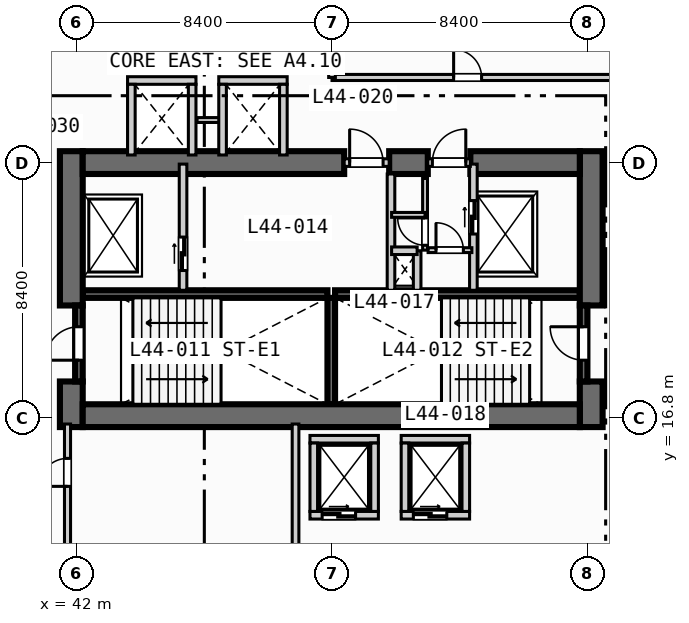
"""IFC4 building model, lengths in metres.
Left out: names, types, materials, properties, quantities, classifications, styles, units other than length and angle.
Written with IfcOpenShell. Run it as: python <this file> out.ifc"""

import sys

from ifc_helpers import new_model, si_unit, direction, frame, frame_2d, origin, place, context, subcontext, project, spatial, rectangle, extrude, element, fill, save


model = new_model("IFC4")
c1 = context("Model", 3, precision=1e-05, world=origin(), true_north=direction((0.0, 1.0)))
c2 = subcontext(c1, "Body", "Model", "MODEL_VIEW")
j1 = project(units=[si_unit("LENGTHUNIT", "METRE"), si_unit("PLANEANGLEUNIT", "RADIAN")], contexts=[c1])
p1 = place(None, origin())
s1 = spatial("IfcSite", under=j1, at=p1, CompositionType="ELEMENT")
p2 = place(p1, origin())
s2 = spatial("IfcBuilding", under=s1, at=p2, CompositionType="ELEMENT")
p3 = place(p2, frame((0.0, 0.0, 182.8)))
s3 = spatial("IfcBuildingStorey", under=s2, at=p3, CompositionType="ELEMENT", Elevation=182.8)
for number, where, z_axis, x_axis in (
    (1, (42.2, 20.875, 0.0), (0.0, 0.0, 1.0), (1.0, 0.0, 0.0)),
    (2, (50.5, 20.875, 0.0), (0.0, 0.0, 1.0), (1.0, 0.0, 0.0)),
):
    element("IfcWall", number, at=place(p3, frame(where, z_axis=z_axis, x_axis=x_axis)), inside=s3, PredefinedType="SOLIDWALL", context=c2, shape_type="SweptSolid", body=[
        extrude(rectangle(XDim=8.05, YDim=0.25, at=frame_2d((4.025, 0.0))), origin(), (0.0, 0.0, 1.0), 3.47),
    ])
p4 = place(p3, frame((50.375, 17.25, 0.0), z_axis=(0.0, 0.0, 1.0), x_axis=(0.0, 1.0, 0.0)))
e3 = element("IfcWall", 3, at=p4, inside=s3, PredefinedType="SOLIDWALL", context=c2, shape_type="SweptSolid", body=[
    extrude(rectangle(XDim=3.5, YDim=0.25, at=frame_2d((1.75, 0.0))), origin(), (0.0, 0.0, 1.0), 3.47),
])
p5 = place(p3, frame((41.825, 16.5, 0.0), z_axis=(0.0, 0.0, 1.0), x_axis=(0.0, 1.0, 0.0)))
e4 = element("IfcWall", 4, at=p5, inside=s3, PredefinedType="SHEAR", context=c2, shape_type="SweptSolid", body=[
    extrude(rectangle(XDim=1.5, YDim=0.75, at=frame_2d((0.75, 0.0))), origin(), (0.0, 0.0, 1.0), 3.47),
])
p6 = place(p3, frame((41.825, 20.5, 0.0), z_axis=(0.0, 0.0, 1.0), x_axis=(0.0, 1.0, 0.0)))
e5 = element("IfcWall", 5, at=p6, inside=s3, PredefinedType="SHEAR", context=c2, shape_type="SweptSolid", body=[
    extrude(rectangle(XDim=5.075, YDim=0.75, at=frame_2d((2.538, 0.0))), origin(), (0.0, 0.0, 1.0), 3.47),
])
p7 = place(p3, frame((58.925, 16.5, 0.0), z_axis=(0.0, 0.0, 1.0), x_axis=(0.0, 1.0, 0.0)))
e6 = element("IfcWall", 6, at=p7, inside=s3, PredefinedType="SHEAR", context=c2, shape_type="SweptSolid", body=[
    extrude(rectangle(XDim=1.5, YDim=0.75, at=frame_2d((0.75, 0.0))), origin(), (0.0, 0.0, 1.0), 3.47),
])
p8 = place(p3, frame((58.925, 20.5, 0.0), z_axis=(0.0, 0.0, 1.0), x_axis=(0.0, 1.0, 0.0)))
e7 = element("IfcWall", 7, at=p8, inside=s3, PredefinedType="SHEAR", context=c2, shape_type="SweptSolid", body=[
    extrude(rectangle(XDim=5.075, YDim=0.75, at=frame_2d((2.538, 0.0))), origin(), (0.0, 0.0, 1.0), 3.47),
])
p9 = place(p3, frame((42.2, 16.875, 0.0), z_axis=(0.0, 0.0, 1.0), x_axis=(1.0, 0.0, 0.0)))
e8 = element("IfcWall", 8, at=p9, inside=s3, PredefinedType="SHEAR", context=c2, shape_type="SweptSolid", body=[
    extrude(rectangle(XDim=16.35, YDim=0.75, at=frame_2d((8.175, 0.0))), origin(), (0.0, 0.0, 1.0), 3.47),
])
p10 = place(p3, frame((42.2, 25.2, 0.0), z_axis=(0.0, 0.0, 1.0), x_axis=(1.0, 0.0, 0.0)))
e9 = element("IfcWall", 9, at=p10, inside=s3, PredefinedType="SHEAR", context=c2, shape_type="SweptSolid", body=[
    extrude(rectangle(XDim=8.6, YDim=0.75, at=frame_2d((4.3, 0.0))), origin(), (0.0, 0.0, 1.0), 3.47),
])
p11 = place(p3, frame((52.28, 25.2, 0.0), z_axis=(0.0, 0.0, 1.0), x_axis=(1.0, 0.0, 0.0)))
e10 = element("IfcWall", 10, at=p11, inside=s3, PredefinedType="SHEAR", context=c2, shape_type="SweptSolid", body=[
    extrude(rectangle(XDim=1.27, YDim=0.75, at=frame_2d((0.635, 0.0))), origin(), (0.0, 0.0, 1.0), 3.47),
])
p12 = place(p3, frame((54.95, 25.2, 0.0), z_axis=(0.0, 0.0, 1.0), x_axis=(1.0, 0.0, 0.0)))
e11 = element("IfcWall", 11, at=p12, inside=s3, PredefinedType="SHEAR", context=c2, shape_type="SweptSolid", body=[
    extrude(rectangle(XDim=3.6, YDim=0.75, at=frame_2d((1.8, 0.0))), origin(), (0.0, 0.0, 1.0), 3.47),
])
p13 = place(p3, frame((42.075, 18.0, 0.0), z_axis=(0.0, 0.0, 1.0), x_axis=(0.0, 1.0, 0.0)))
e12 = element("IfcWall", 12, at=p13, inside=s3, PredefinedType="SOLIDWALL", context=c2, shape_type="SweptSolid", body=[
    extrude(rectangle(XDim=2.5, YDim=0.25, at=frame_2d((1.25, 0.0))), origin(), (0.0, 0.0, 1.0), 3.47),
])
p14 = place(p13, frame((0.7, 0.0, 0.0)))
e13 = element("IfcOpeningElement", 13, at=p14, cuts=e12, PredefinedType="OPENING", context=c2, shape_type="SweptSolid", body=[
    extrude(rectangle(XDim=1.1, YDim=2.15, at=frame_2d((0.55, 1.075))), frame((0.0, 0.135, 0.0), z_axis=(0.0, -1.0, 0.0), x_axis=(1.0, 0.0, 0.0)), (0.0, 0.0, 1.0), 0.27),
])
p15 = place(p3, frame((58.675, 18.0, 0.0), z_axis=(0.0, 0.0, 1.0), x_axis=(0.0, 1.0, 0.0)))
e14 = element("IfcWall", 14, at=p15, inside=s3, PredefinedType="SOLIDWALL", context=c2, shape_type="SweptSolid", body=[
    extrude(rectangle(XDim=2.5, YDim=0.25, at=frame_2d((1.25, 0.0))), origin(), (0.0, 0.0, 1.0), 3.47),
])
p16 = place(p15, frame((0.7, 0.0, 0.0)))
e15 = element("IfcOpeningElement", 15, at=p16, cuts=e14, PredefinedType="OPENING", context=c2, shape_type="SweptSolid", body=[
    extrude(rectangle(XDim=1.1, YDim=2.15, at=frame_2d((0.55, 1.075))), frame((0.0, 0.135, 0.0), z_axis=(0.0, -1.0, 0.0), x_axis=(1.0, 0.0, 0.0)), (0.0, 0.0, 1.0), 0.27),
])
p17 = place(p3, frame((45.5, 21.0, 0.0), z_axis=(0.0, 0.0, 1.0), x_axis=(0.0, 1.0, 0.0)))
e16 = element("IfcWall", 16, at=p17, inside=s3, PredefinedType="SOLIDWALL", context=c2, shape_type="SweptSolid", body=[
    extrude(rectangle(XDim=4.15, YDim=0.25, at=frame_2d((2.075, 0.0))), origin(), (0.0, 0.0, 1.0), 3.47),
])
p18 = place(p17, frame((0.65, 0.0, 0.0)))
e17 = element("IfcOpeningElement", 17, at=p18, cuts=e16, PredefinedType="OPENING", context=c2, shape_type="SweptSolid", body=[
    extrude(rectangle(XDim=1.1, YDim=2.15, at=frame_2d((0.55, 1.075))), frame((0.0, 0.135, 0.0), z_axis=(0.0, -1.0, 0.0), x_axis=(1.0, 0.0, 0.0)), (0.0, 0.0, 1.0), 0.27),
])
p19 = place(p3, frame((50.8, 25.2, 0.0), z_axis=(0.0, 0.0, 1.0), x_axis=(1.0, 0.0, 0.0)))
e18 = element("IfcWall", 18, at=p19, inside=s3, PredefinedType="SOLIDWALL", context=c2, shape_type="SweptSolid", body=[
    extrude(rectangle(XDim=1.48, YDim=0.25, at=frame_2d((0.74, 0.0))), origin(), (0.0, 0.0, 1.0), 3.47),
])
p20 = place(p19, frame((0.18, 0.0, 0.0)))
e19 = element("IfcOpeningElement", 19, at=p20, cuts=e18, PredefinedType="OPENING", context=c2, shape_type="SweptSolid", body=[
    extrude(rectangle(XDim=1.1, YDim=2.15, at=frame_2d((0.55, 1.075))), frame((0.0, 0.135, 0.0), z_axis=(0.0, -1.0, 0.0), x_axis=(1.0, 0.0, 0.0)), (0.0, 0.0, 1.0), 0.27),
])
p21 = place(p3, frame((52.34, 21.0, 0.0), z_axis=(0.0, 0.0, 1.0), x_axis=(0.0, 1.0, 0.0)))
e20 = element("IfcWall", 20, at=p21, inside=s3, PredefinedType="SOLIDWALL", context=c2, shape_type="SweptSolid", body=[
    extrude(rectangle(XDim=3.825, YDim=0.25, at=frame_2d((1.913, 0.0))), origin(), (0.0, 0.0, 1.0), 3.47),
])
p22 = place(p3, frame((55.05, 21.0, 0.0), z_axis=(0.0, 0.0, 1.0), x_axis=(0.0, 1.0, 0.0)))
e21 = element("IfcWall", 21, at=p22, inside=s3, PredefinedType="SOLIDWALL", context=c2, shape_type="SweptSolid", body=[
    extrude(rectangle(XDim=4.15, YDim=0.25, at=frame_2d((2.075, 0.0))), origin(), (0.0, 0.0, 1.0), 3.47),
])
p23 = place(p22, frame((1.85, 0.0, 0.0)))
e22 = element("IfcOpeningElement", 22, at=p23, cuts=e21, PredefinedType="OPENING", context=c2, shape_type="SweptSolid", body=[
    extrude(rectangle(XDim=1.1, YDim=2.15, at=frame_2d((0.55, 1.075))), frame((0.0, 0.135, 0.0), z_axis=(0.0, -1.0, 0.0), x_axis=(1.0, 0.0, 0.0)), (0.0, 0.0, 1.0), 0.27),
])
p24 = place(p3, frame((53.55, 25.2, 0.0), z_axis=(0.0, 0.0, 1.0), x_axis=(1.0, 0.0, 0.0)))
e23 = element("IfcWall", 23, at=p24, inside=s3, PredefinedType="SOLIDWALL", context=c2, shape_type="SweptSolid", body=[
    extrude(rectangle(XDim=1.4, YDim=0.25, at=frame_2d((0.7, 0.0))), origin(), (0.0, 0.0, 1.0), 3.47),
])
p25 = place(p24, frame((0.15, 0.0, 0.0)))
e24 = element("IfcOpeningElement", 24, at=p25, cuts=e23, PredefinedType="OPENING", context=c2, shape_type="SweptSolid", body=[
    extrude(rectangle(XDim=1.1, YDim=2.15, at=frame_2d((0.55, 1.075))), frame((0.0, 0.135, 0.0), z_axis=(0.0, -1.0, 0.0), x_axis=(1.0, 0.0, 0.0)), (0.0, 0.0, 1.0), 0.27),
])
p26 = place(p3, frame((53.2, 21.0, 0.0), z_axis=(0.0, 0.0, 1.0), x_axis=(0.0, 1.0, 0.0)))
e25 = element("IfcWall", 25, at=p26, inside=s3, PredefinedType="SOLIDWALL", context=c2, shape_type="SweptSolid", body=[
    extrude(rectangle(XDim=1.3, YDim=0.25, at=frame_2d((0.65, 0.0))), origin(), (0.0, 0.0, 1.0), 3.47),
])
p27 = place(p3, frame((52.36, 22.3, 0.0), z_axis=(0.0, 0.0, 1.0), x_axis=(1.0, 0.0, 0.0)))
e26 = element("IfcWall", 26, at=p27, inside=s3, PredefinedType="SOLIDWALL", context=c2, shape_type="SweptSolid", body=[
    extrude(rectangle(XDim=0.84, YDim=0.25, at=frame_2d((0.42, 0.0))), origin(), (0.0, 0.0, 1.0), 3.47),
])
p28 = place(p3, frame((53.56, 22.32, 0.0), z_axis=(0.0, 0.0, 1.0), x_axis=(1.0, 0.0, 0.0)))
e27 = element("IfcWall", 27, at=p28, inside=s3, PredefinedType="PARTITIONING", context=c2, shape_type="SweptSolid", body=[
    extrude(rectangle(XDim=1.44, YDim=0.16, at=frame_2d((0.72, 0.0))), origin(), (0.0, 0.0, 1.0), 3.47),
])
p29 = place(p28, frame((0.26, 0.0, 0.0)))
e28 = element("IfcOpeningElement", 28, at=p29, cuts=e27, PredefinedType="OPENING", context=c2, shape_type="SweptSolid", body=[
    extrude(rectangle(XDim=0.9, YDim=2.1, at=frame_2d((0.45, 1.05))), frame((0.0, 0.09, 0.0), z_axis=(0.0, -1.0, 0.0), x_axis=(1.0, 0.0, 0.0)), (0.0, 0.0, 1.0), 0.18),
])
p30 = place(p3, frame((53.46, 22.32, 0.0), z_axis=(0.0, 0.0, 1.0), x_axis=(0.0, 1.0, 0.0)))
e29 = element("IfcWall", 29, at=p30, inside=s3, PredefinedType="PARTITIONING", context=c2, shape_type="SweptSolid", body=[
    extrude(rectangle(XDim=2.36, YDim=0.16, at=frame_2d((1.18, 0.0))), origin(), (0.0, 0.0, 1.0), 3.47),
])
p31 = place(p30, frame((0.16, 0.0, 0.0)))
e30 = element("IfcOpeningElement", 30, at=p31, cuts=e29, PredefinedType="OPENING", context=c2, shape_type="SweptSolid", body=[
    extrude(rectangle(XDim=0.9, YDim=2.1, at=frame_2d((0.45, 1.05))), frame((0.0, 0.09, 0.0), z_axis=(0.0, -1.0, 0.0), x_axis=(1.0, 0.0, 0.0)), (0.0, 0.0, 1.0), 0.18),
])
p32 = place(p3, frame((52.36, 23.48, 0.0), z_axis=(0.0, 0.0, 1.0), x_axis=(1.0, 0.0, 0.0)))
e31 = element("IfcWall", 31, at=p32, inside=s3, PredefinedType="PARTITIONING", context=c2, shape_type="SweptSolid", body=[
    extrude(rectangle(XDim=1.1, YDim=0.16, at=frame_2d((0.55, 0.0))), origin(), (0.0, 0.0, 1.0), 3.47),
])
p33 = place(p3, frame((49.675, 13.6, 0.0), z_axis=(0.0, 0.0, 1.0), x_axis=(1.0, 0.0, 0.0)))
e32 = element("IfcWall", 32, at=p33, inside=s3, PredefinedType="SOLIDWALL", context=c2, shape_type="SweptSolid", body=[
    extrude(rectangle(XDim=2.25, YDim=0.25, at=frame_2d((1.125, 0.0))), origin(), (0.0, 0.0, 1.0), 3.47),
])
p34 = place(p33, frame((0.4, 0.0, 0.0)))
e33 = element("IfcOpeningElement", 33, at=p34, cuts=e32, PredefinedType="OPENING", context=c2, shape_type="SweptSolid", body=[
    extrude(rectangle(XDim=1.1, YDim=2.15, at=frame_2d((0.55, 1.075))), frame((0.0, 0.135, 0.0), z_axis=(0.0, -1.0, 0.0), x_axis=(1.0, 0.0, 0.0)), (0.0, 0.0, 1.0), 0.27),
])
for number, where, z_axis, x_axis in (
    (34, (49.675, 16.1, 0.0), (0.0, 0.0, 1.0), (1.0, 0.0, 0.0)),
    (35, (49.8, 13.725, 0.0), (0.0, 0.0, 1.0), (0.0, 1.0, 0.0)),
    (36, (51.8, 13.725, 0.0), (0.0, 0.0, 1.0), (0.0, 1.0, 0.0)),
):
    element("IfcWall", number, at=place(p3, frame(where, z_axis=z_axis, x_axis=x_axis)), inside=s3, PredefinedType="SOLIDWALL", context=c2, shape_type="SweptSolid", body=[
        extrude(rectangle(XDim=2.25, YDim=0.25, at=frame_2d((1.125, 0.0))), origin(), (0.0, 0.0, 1.0), 3.47),
    ])
p35 = place(p3, frame((52.675, 13.6, 0.0), z_axis=(0.0, 0.0, 1.0), x_axis=(1.0, 0.0, 0.0)))
e37 = element("IfcWall", 37, at=p35, inside=s3, PredefinedType="SOLIDWALL", context=c2, shape_type="SweptSolid", body=[
    extrude(rectangle(XDim=2.25, YDim=0.25, at=frame_2d((1.125, 0.0))), origin(), (0.0, 0.0, 1.0), 3.47),
])
p36 = place(p35, frame((0.4, 0.0, 0.0)))
e38 = element("IfcOpeningElement", 38, at=p36, cuts=e37, PredefinedType="OPENING", context=c2, shape_type="SweptSolid", body=[
    extrude(rectangle(XDim=1.1, YDim=2.15, at=frame_2d((0.55, 1.075))), frame((0.0, 0.135, 0.0), z_axis=(0.0, -1.0, 0.0), x_axis=(1.0, 0.0, 0.0)), (0.0, 0.0, 1.0), 0.27),
])
for number, where, z_axis, x_axis in (
    (39, (52.675, 16.1, 0.0), (0.0, 0.0, 1.0), (1.0, 0.0, 0.0)),
    (40, (52.8, 13.725, 0.0), (0.0, 0.0, 1.0), (0.0, 1.0, 0.0)),
    (41, (54.8, 13.725, 0.0), (0.0, 0.0, 1.0), (0.0, 1.0, 0.0)),
    (42, (43.675, 27.9, 0.0), (0.0, 0.0, 1.0), (1.0, 0.0, 0.0)),
):
    element("IfcWall", number, at=place(p3, frame(where, z_axis=z_axis, x_axis=x_axis)), inside=s3, PredefinedType="SOLIDWALL", context=c2, shape_type="SweptSolid", body=[
        extrude(rectangle(XDim=2.25, YDim=0.25, at=frame_2d((1.125, 0.0))), origin(), (0.0, 0.0, 1.0), 3.47),
    ])
for number, where, z_axis, x_axis in (
    (43, (43.8, 25.45, 0.0), (0.0, 0.0, 1.0), (0.0, 1.0, 0.0)),
    (44, (45.8, 25.45, 0.0), (0.0, 0.0, 1.0), (0.0, 1.0, 0.0)),
):
    element("IfcWall", number, at=place(p3, frame(where, z_axis=z_axis, x_axis=x_axis)), inside=s3, PredefinedType="SOLIDWALL", context=c2, shape_type="SweptSolid", body=[
        extrude(rectangle(XDim=2.325, YDim=0.25, at=frame_2d((1.163, 0.0))), origin(), (0.0, 0.0, 1.0), 3.47),
    ])
p37 = place(p3, frame((45.96, 26.6, 0.0), z_axis=(0.0, 0.0, 1.0), x_axis=(1.0, 0.0, 0.0)))
e45 = element("IfcWall", 45, at=p37, inside=s3, PredefinedType="PARTITIONING", context=c2, shape_type="SweptSolid", body=[
    extrude(rectangle(XDim=0.88, YDim=0.16, at=frame_2d((0.44, 0.0))), origin(), (0.0, 0.0, 1.0), 3.47),
])
p38 = place(p3, frame((46.675, 27.9, 0.0), z_axis=(0.0, 0.0, 1.0), x_axis=(1.0, 0.0, 0.0)))
e46 = element("IfcWall", 46, at=p38, inside=s3, PredefinedType="SOLIDWALL", context=c2, shape_type="SweptSolid", body=[
    extrude(rectangle(XDim=2.25, YDim=0.25, at=frame_2d((1.125, 0.0))), origin(), (0.0, 0.0, 1.0), 3.47),
])
for number, where, z_axis, x_axis in (
    (47, (46.8, 25.45, 0.0), (0.0, 0.0, 1.0), (0.0, 1.0, 0.0)),
    (48, (48.8, 25.45, 0.0), (0.0, 0.0, 1.0), (0.0, 1.0, 0.0)),
):
    element("IfcWall", number, at=place(p3, frame(where, z_axis=z_axis, x_axis=x_axis)), inside=s3, PredefinedType="SOLIDWALL", context=c2, shape_type="SweptSolid", body=[
        extrude(rectangle(XDim=2.325, YDim=0.25, at=frame_2d((1.163, 0.0))), origin(), (0.0, 0.0, 1.0), 3.47),
    ])
p39 = place(p3, frame((41.7, 0.35, 0.0), z_axis=(0.0, 0.0, 1.0), x_axis=(0.0, 1.0, 0.0)))
e49 = element("IfcWall", 49, at=p39, inside=s3, PredefinedType="PARTITIONING", context=c2, shape_type="SweptSolid", body=[
    extrude(rectangle(XDim=16.25, YDim=0.2, at=frame_2d((8.125, 0.0))), origin(), (0.0, 0.0, 1.0), 2.82),
])
p40 = place(p39, frame((14.2, 0.0, 0.0)))
e50 = element("IfcOpeningElement", 50, at=p40, cuts=e49, PredefinedType="OPENING", context=c2, shape_type="SweptSolid", body=[
    extrude(rectangle(XDim=0.92, YDim=2.1, at=frame_2d((0.46, 1.05))), frame((0.0, 0.11, 0.0), z_axis=(0.0, -1.0, 0.0), x_axis=(1.0, 0.0, 0.0)), (0.0, 0.0, 1.0), 0.22),
])
p41 = place(p3, frame((49.2, 0.35, 0.0), z_axis=(0.0, 0.0, 1.0), x_axis=(0.0, 1.0, 0.0)))
e51 = element("IfcWall", 51, at=p41, inside=s3, PredefinedType="PARTITIONING", context=c2, shape_type="SweptSolid", body=[
    extrude(rectangle(XDim=16.25, YDim=0.22, at=frame_2d((8.125, 0.0))), origin(), (0.0, 0.0, 1.0), 3.47),
])
p42 = place(p3, frame((50.4, 28.0, 0.0), z_axis=(0.0, 0.0, 1.0), x_axis=(1.0, 0.0, 0.0)))
e52 = element("IfcWall", 52, at=p42, inside=s3, PredefinedType="PARTITIONING", context=c2, shape_type="SweptSolid", body=[
    extrude(rectangle(XDim=21.8, YDim=0.2, at=frame_2d((10.9, 0.0))), origin(), (0.0, 0.0, 1.0), 3.47),
])
p43 = place(p42, frame((4.0, 0.0, 0.0)))
e53 = element("IfcOpeningElement", 53, at=p43, cuts=e52, PredefinedType="OPENING", context=c2, shape_type="SweptSolid", body=[
    extrude(rectangle(XDim=0.92, YDim=2.1, at=frame_2d((0.46, 1.05))), frame((0.0, 0.11, 0.0), z_axis=(0.0, -1.0, 0.0), x_axis=(1.0, 0.0, 0.0)), (0.0, 0.0, 1.0), 0.22),
])
p44 = place(p3, frame((50.4, 28.0, 0.0), z_axis=(0.0, 0.0, 1.0), x_axis=(0.0, 1.0, 0.0)))
e54 = element("IfcWall", 54, at=p44, inside=s3, PredefinedType="PARTITIONING", context=c2, shape_type="SweptSolid", body=[
    extrude(rectangle(XDim=5.3, YDim=0.22, at=frame_2d((2.65, 0.0))), origin(), (0.0, 0.0, 1.0), 2.82),
])
p45 = place(p14, origin())
e55 = element("IfcDoor", 55, at=p45, inside=s3, OperationType="SINGLE_SWING_LEFT", PredefinedType="DOOR", context=c2, shape_type="SweptSolid", body=[
    extrude(rectangle(XDim=1.1, YDim=2.15, at=frame_2d((0.55, 1.075))), frame((0.0, 0.025, 0.0), z_axis=(0.0, -1.0, 0.0), x_axis=(1.0, 0.0, 0.0)), (0.0, 0.0, 1.0), 0.05),
])
fill(e13, e55)
p46 = place(p16, origin())
e56 = element("IfcDoor", 56, at=p46, inside=s3, OperationType="SINGLE_SWING_RIGHT", PredefinedType="DOOR", context=c2, shape_type="SweptSolid", body=[
    extrude(rectangle(XDim=1.1, YDim=2.15, at=frame_2d((0.55, 1.075))), frame((0.0, 0.025, 0.0), z_axis=(0.0, -1.0, 0.0), x_axis=(1.0, 0.0, 0.0)), (0.0, 0.0, 1.0), 0.05),
])
fill(e15, e56)
p47 = place(p18, origin())
e57 = element("IfcDoor", 57, at=p47, inside=s3, OperationType="SLIDING_TO_LEFT", PredefinedType="DOOR", context=c2, shape_type="SweptSolid", body=[
    extrude(rectangle(XDim=1.1, YDim=2.15, at=frame_2d((0.55, 1.075))), frame((0.0, 0.025, 0.0), z_axis=(0.0, -1.0, 0.0), x_axis=(1.0, 0.0, 0.0)), (0.0, 0.0, 1.0), 0.05),
])
fill(e17, e57)
p48 = place(p20, origin())
e58 = element("IfcDoor", 58, at=p48, inside=s3, OperationType="SINGLE_SWING_LEFT", PredefinedType="DOOR", context=c2, shape_type="SweptSolid", body=[
    extrude(rectangle(XDim=1.1, YDim=2.15, at=frame_2d((0.55, 1.075))), frame((0.0, 0.025, 0.0), z_axis=(0.0, -1.0, 0.0), x_axis=(1.0, 0.0, 0.0)), (0.0, 0.0, 1.0), 0.05),
])
fill(e19, e58)
p49 = place(p23, origin())
e59 = element("IfcDoor", 59, at=p49, inside=s3, OperationType="SLIDING_TO_LEFT", PredefinedType="DOOR", context=c2, shape_type="SweptSolid", body=[
    extrude(rectangle(XDim=1.1, YDim=2.15, at=frame_2d((0.55, 1.075))), frame((0.0, 0.025, 0.0), z_axis=(0.0, -1.0, 0.0), x_axis=(1.0, 0.0, 0.0)), (0.0, 0.0, 1.0), 0.05),
])
fill(e22, e59)
p50 = place(p25, origin())
e60 = element("IfcDoor", 60, at=p50, inside=s3, OperationType="SINGLE_SWING_RIGHT", PredefinedType="DOOR", context=c2, shape_type="SweptSolid", body=[
    extrude(rectangle(XDim=1.1, YDim=2.15, at=frame_2d((0.55, 1.075))), frame((0.0, 0.025, 0.0), z_axis=(0.0, -1.0, 0.0), x_axis=(1.0, 0.0, 0.0)), (0.0, 0.0, 1.0), 0.05),
])
fill(e24, e60)
p51 = place(p29, origin())
e61 = element("IfcDoor", 61, at=p51, inside=s3, OperationType="SINGLE_SWING_LEFT", PredefinedType="DOOR", context=c2, shape_type="SweptSolid", body=[
    extrude(rectangle(XDim=0.9, YDim=2.1, at=frame_2d((0.45, 1.05))), frame((0.0, 0.025, 0.0), z_axis=(0.0, -1.0, 0.0), x_axis=(1.0, 0.0, 0.0)), (0.0, 0.0, 1.0), 0.05),
])
fill(e28, e61)
p52 = place(p31, origin())
e62 = element("IfcDoor", 62, at=p52, inside=s3, OperationType="SINGLE_SWING_RIGHT", PredefinedType="DOOR", context=c2, shape_type="SweptSolid", body=[
    extrude(rectangle(XDim=0.9, YDim=2.1, at=frame_2d((0.45, 1.05))), frame((0.0, 0.025, 0.0), z_axis=(0.0, -1.0, 0.0), x_axis=(1.0, 0.0, 0.0)), (0.0, 0.0, 1.0), 0.05),
])
fill(e30, e62)
p53 = place(p34, origin())
e63 = element("IfcDoor", 63, at=p53, inside=s3, OperationType="SLIDING_TO_LEFT", PredefinedType="DOOR", context=c2, shape_type="SweptSolid", body=[
    extrude(rectangle(XDim=1.1, YDim=2.15, at=frame_2d((0.55, 1.075))), frame((0.0, 0.025, 0.0), z_axis=(0.0, -1.0, 0.0), x_axis=(1.0, 0.0, 0.0)), (0.0, 0.0, 1.0), 0.05),
])
fill(e33, e63)
p54 = place(p36, origin())
e64 = element("IfcDoor", 64, at=p54, inside=s3, OperationType="SLIDING_TO_LEFT", PredefinedType="DOOR", context=c2, shape_type="SweptSolid", body=[
    extrude(rectangle(XDim=1.1, YDim=2.15, at=frame_2d((0.55, 1.075))), frame((0.0, 0.025, 0.0), z_axis=(0.0, -1.0, 0.0), x_axis=(1.0, 0.0, 0.0)), (0.0, 0.0, 1.0), 0.05),
])
fill(e38, e64)
p55 = place(p40, origin())
e65 = element("IfcDoor", 65, at=p55, inside=s3, OperationType="SINGLE_SWING_LEFT", PredefinedType="DOOR", context=c2, shape_type="SweptSolid", body=[
    extrude(rectangle(XDim=0.92, YDim=2.1, at=frame_2d((0.46, 1.05))), frame((0.0, 0.025, 0.0), z_axis=(0.0, -1.0, 0.0), x_axis=(1.0, 0.0, 0.0)), (0.0, 0.0, 1.0), 0.05),
])
fill(e50, e65)
p56 = place(p43, origin())
e66 = element("IfcDoor", 66, at=p56, inside=s3, OperationType="SINGLE_SWING_LEFT", PredefinedType="DOOR", context=c2, shape_type="SweptSolid", body=[
    extrude(rectangle(XDim=0.92, YDim=2.1, at=frame_2d((0.46, 1.05))), frame((0.0, 0.025, 0.0), z_axis=(0.0, -1.0, 0.0), x_axis=(1.0, 0.0, 0.0)), (0.0, 0.0, 1.0), 0.05),
])
fill(e53, e66)
save(model, sys.argv[1])
